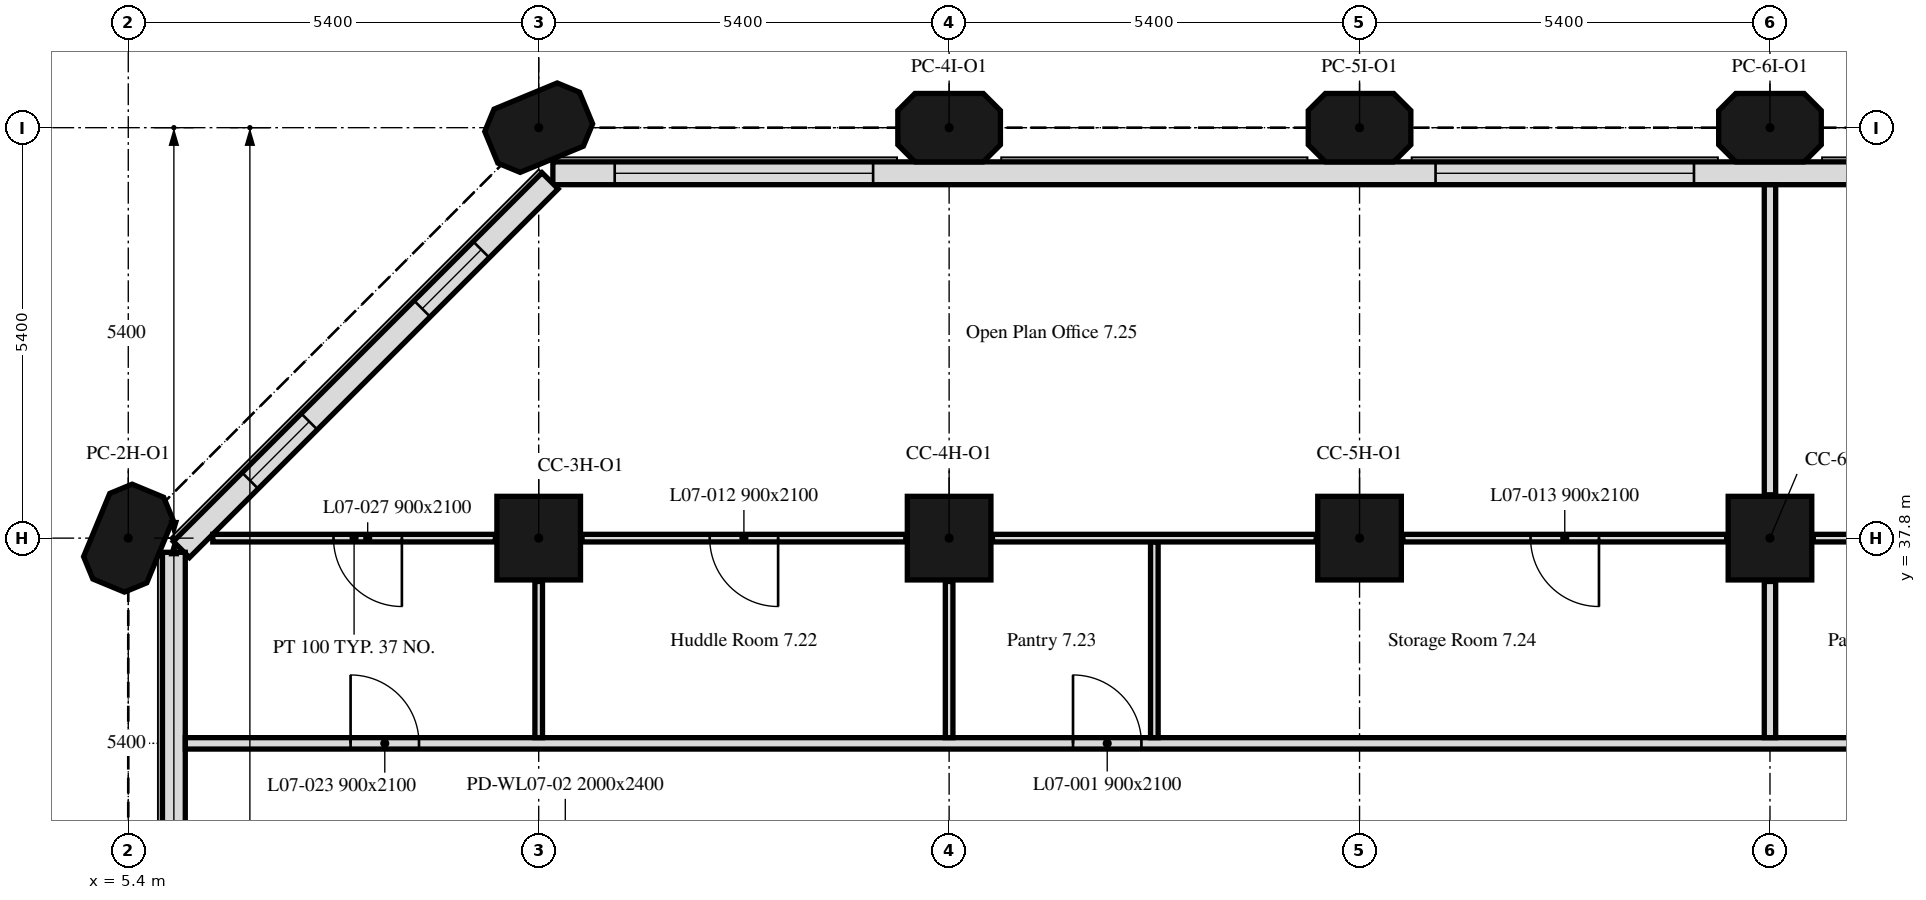
"""IFC4 building model, lengths in metres.
Left out: names, types, materials, properties, quantities, classifications, styles, units other than length and angle.
Written with IfcOpenShell. Run it as: python <this file> out.ifc"""

import sys

from ifc_helpers import new_model, si_unit, direction, frame, frame_2d, origin, origin_2d, place, context, subcontext, project, spatial, polyline, rectangle, outline, extrude, element, fill, save


model = new_model("IFC4")
c1 = context("Model", 3, precision=1e-05, world=origin(), true_north=direction((0.0, 1.0)))
c2 = subcontext(c1, "Body", "Model", "MODEL_VIEW")
j1 = project(units=[si_unit("LENGTHUNIT", "METRE"), si_unit("PLANEANGLEUNIT", "RADIAN")], contexts=[c1])
p1 = place(None, origin())
s1 = spatial("IfcSite", under=j1, at=p1, CompositionType="ELEMENT")
p2 = place(p1, origin())
s2 = spatial("IfcBuilding", under=s1, at=p2, CompositionType="ELEMENT")
p3 = place(p2, frame((0.0, 0.0, 37.4)))
s3 = spatial("IfcBuildingStorey", under=s2, at=p3, CompositionType="ELEMENT", Elevation=37.4)
p4 = place(p3, frame((5.4, 37.8, 0.0), z_axis=(0.0, 0.0, 1.0), x_axis=(0.382683432365, 0.923879532511, 0.0)))
e1 = element("IfcColumn", 1, at=p4, inside=s3, PredefinedType="COLUMN", context=c2, shape_type="SweptSolid", body=[
    extrude(outline(polyline([(-0.45, -0.45), (0.45, -0.45), (0.675, -0.225), (0.675, 0.225), (0.45, 0.45), (-0.45, 0.45), (-0.675, 0.225), (-0.675, -0.225), (-0.45, -0.45)])), origin(), (0.0, 0.0, 1.0), 3.5),
])
for number, where, z_axis, x_axis in (
    (2, (10.8, 37.8, 0.0), (0.0, 0.0, 1.0), (1.0, 0.0, 0.0)),
    (3, (16.2, 37.8, 0.0), (0.0, 0.0, 1.0), (1.0, 0.0, 0.0)),
    (4, (21.6, 37.8, 0.0), (0.0, 0.0, 1.0), (1.0, 0.0, 0.0)),
    (5, (27.0, 37.8, 0.0), (0.0, 0.0, 1.0), (1.0, 0.0, 0.0)),
):
    element("IfcColumn", number, at=place(p3, frame(where, z_axis=z_axis, x_axis=x_axis)), inside=s3, PredefinedType="COLUMN", context=c2, shape_type="SweptSolid", body=[
        extrude(rectangle(XDim=1.1, YDim=1.1, at=origin_2d()), origin(), (0.0, 0.0, 1.0), 3.5),
    ])
for number, where, z_axis, x_axis in (
    (6, (10.8, 43.2, 0.0), (0.0, 0.0, 1.0), (0.924, 0.383, 0.0)),
    (7, (16.2, 43.2, 0.0), (0.0, 0.0, 1.0), (1.0, 0.0, 0.0)),
    (8, (21.6, 43.2, 0.0), (0.0, 0.0, 1.0), (1.0, 0.0, 0.0)),
    (9, (27.0, 43.2, 0.0), (0.0, 0.0, 1.0), (1.0, 0.0, 0.0)),
):
    element("IfcColumn", number, at=place(p3, frame(where, z_axis=z_axis, x_axis=x_axis)), inside=s3, PredefinedType="COLUMN", context=c2, shape_type="SweptSolid", body=[
        extrude(outline(polyline([(-0.45, -0.45), (0.45, -0.45), (0.675, -0.225), (0.675, 0.225), (0.45, 0.45), (-0.45, 0.45), (-0.675, 0.225), (-0.675, -0.225), (-0.45, -0.45)])), origin(), (0.0, 0.0, 1.0), 3.5),
    ])
p5 = place(p3, frame((43.014, 42.6, 0.0), z_axis=(0.0, 0.0, 1.0), x_axis=(-1.0, 0.0, 0.0)))
e10 = element("IfcWall", 10, at=p5, inside=s3, PredefinedType="SOLIDWALL", context=c2, shape_type="SweptSolid", body=[
    extrude(rectangle(XDim=32.027, YDim=0.3, at=frame_2d((16.014, 0.0))), origin(), (0.0, 0.0, 1.0), 3.5),
])
p6 = place(p5, frame((6.214, 0.0, 0.9)))
e11 = element("IfcOpeningElement", 11, at=p6, cuts=e10, PredefinedType="OPENING", context=c2, shape_type="SweptSolid", body=[
    extrude(rectangle(XDim=3.4, YDim=1.7, at=frame_2d((1.7, 0.85))), frame((0.0, 0.16, 0.0), z_axis=(0.0, -1.0, 0.0), x_axis=(1.0, 0.0, 0.0)), (0.0, 0.0, 1.0), 0.32),
])
p7 = place(p5, frame((17.014, 0.0, 0.9)))
e12 = element("IfcOpeningElement", 12, at=p7, cuts=e10, PredefinedType="OPENING", context=c2, shape_type="SweptSolid", body=[
    extrude(rectangle(XDim=3.4, YDim=1.7, at=frame_2d((1.7, 0.85))), frame((0.0, 0.16, 0.0), z_axis=(0.0, -1.0, 0.0), x_axis=(1.0, 0.0, 0.0)), (0.0, 0.0, 1.0), 0.32),
])
p8 = place(p5, frame((27.814, 0.0, 0.9)))
e13 = element("IfcOpeningElement", 13, at=p8, cuts=e10, PredefinedType="OPENING", context=c2, shape_type="SweptSolid", body=[
    extrude(rectangle(XDim=3.4, YDim=1.7, at=frame_2d((1.7, 0.85))), frame((0.0, 0.16, 0.0), z_axis=(0.0, -1.0, 0.0), x_axis=(1.0, 0.0, 0.0)), (0.0, 0.0, 1.0), 0.32),
])
p9 = place(p3, frame((10.949, 42.501, 0.0), z_axis=(0.0, 0.0, 1.0), x_axis=(-0.707106781187, -0.707106781187, 0.0)))
e14 = element("IfcWall", 14, at=p9, inside=s3, PredefinedType="SOLIDWALL", context=c2, shape_type="SweptSolid", body=[
    extrude(rectangle(XDim=6.86, YDim=0.3, at=frame_2d((3.43, 0.0))), origin(), (0.0, 0.0, 1.0), 3.5),
])
p10 = place(p9, frame((1.28, 0.0, 0.9)))
e15 = element("IfcOpeningElement", 15, at=p10, cuts=e14, PredefinedType="OPENING", context=c2, shape_type="SweptSolid", body=[
    extrude(rectangle(XDim=1.1, YDim=1.7, at=frame_2d((0.55, 0.85))), frame((0.0, 0.16, 0.0), z_axis=(0.0, -1.0, 0.0), x_axis=(1.0, 0.0, 0.0)), (0.0, 0.0, 1.0), 0.32),
])
p11 = place(p9, frame((4.48, 0.0, 0.9)))
e16 = element("IfcOpeningElement", 16, at=p11, cuts=e14, PredefinedType="OPENING", context=c2, shape_type="SweptSolid", body=[
    extrude(rectangle(XDim=1.1, YDim=1.7, at=frame_2d((0.55, 0.85))), frame((0.0, 0.16, 0.0), z_axis=(0.0, -1.0, 0.0), x_axis=(1.0, 0.0, 0.0)), (0.0, 0.0, 1.0), 0.32),
])
p12 = place(p3, frame((6.0, 37.614, 0.0), z_axis=(0.0, 0.0, 1.0), x_axis=(0.0, -1.0, 0.0)))
e17 = element("IfcWall", 17, at=p12, inside=s3, PredefinedType="SOLIDWALL", context=c2, shape_type="SweptSolid", body=[
    extrude(rectangle(XDim=5.214, YDim=0.3, at=frame_2d((2.607, 0.0))), origin(), (0.0, 0.0, 1.0), 3.5),
])
p13 = place(p3, frame((6.151, 35.1, 0.0), z_axis=(0.0, 0.0, 1.0), x_axis=(1.0, 0.0, 0.0)))
e18 = element("IfcWall", 18, at=p13, inside=s3, PredefinedType="PARTITIONING", context=c2, shape_type="SweptSolid", body=[
    extrude(rectangle(XDim=41.698, YDim=0.15, at=frame_2d((20.849, 0.0))), origin(), (0.0, 0.0, 1.0), 3.5),
])
p14 = place(p13, frame((11.679, 0.0, 0.0)))
e19 = element("IfcOpeningElement", 19, at=p14, cuts=e18, PredefinedType="OPENING", context=c2, shape_type="SweptSolid", body=[
    extrude(rectangle(XDim=0.9, YDim=2.1, at=frame_2d((0.45, 1.05))), frame((0.0, 0.075, 0.0), z_axis=(0.0, -1.0, 0.0), x_axis=(1.0, 0.0, 0.0)), (0.0, 0.0, 1.0), 0.15),
])
p15 = place(p13, frame((22.479, 0.0, 0.0)))
e20 = element("IfcOpeningElement", 20, at=p15, cuts=e18, PredefinedType="OPENING", context=c2, shape_type="SweptSolid", body=[
    extrude(rectangle(XDim=0.9, YDim=2.1, at=frame_2d((0.45, 1.05))), frame((0.0, 0.075, 0.0), z_axis=(0.0, -1.0, 0.0), x_axis=(1.0, 0.0, 0.0)), (0.0, 0.0, 1.0), 0.15),
])
p16 = place(p13, frame((23.719, 0.0, 0.0)))
e21 = element("IfcOpeningElement", 21, at=p16, cuts=e18, PredefinedType="OPENING", context=c2, shape_type="SweptSolid", body=[
    extrude(rectangle(XDim=0.9, YDim=2.1, at=frame_2d((0.45, 1.05))), frame((0.0, 0.075, 0.0), z_axis=(0.0, -1.0, 0.0), x_axis=(1.0, 0.0, 0.0)), (0.0, 0.0, 1.0), 0.15),
])
p17 = place(p13, frame((33.279, 0.0, 0.0)))
e22 = element("IfcOpeningElement", 22, at=p17, cuts=e18, PredefinedType="OPENING", context=c2, shape_type="SweptSolid", body=[
    extrude(rectangle(XDim=0.9, YDim=2.1, at=frame_2d((0.45, 1.05))), frame((0.0, 0.075, 0.0), z_axis=(0.0, -1.0, 0.0), x_axis=(1.0, 0.0, 0.0)), (0.0, 0.0, 1.0), 0.15),
])
p18 = place(p13, frame((2.174, 0.0, 0.0)))
e23 = element("IfcOpeningElement", 23, at=p18, cuts=e18, PredefinedType="OPENING", context=c2, shape_type="SweptSolid", body=[
    extrude(rectangle(XDim=0.9, YDim=2.1, at=frame_2d((0.45, 1.05))), frame((0.0, 0.075, 0.0), z_axis=(0.0, -1.0, 0.0), x_axis=(1.0, 0.0, 0.0)), (0.0, 0.0, 1.0), 0.15),
])
p19 = place(p13, frame((34.519, 0.0, 0.0)))
e24 = element("IfcOpeningElement", 24, at=p19, cuts=e18, PredefinedType="OPENING", context=c2, shape_type="SweptSolid", body=[
    extrude(rectangle(XDim=0.9, YDim=2.1, at=frame_2d((0.45, 1.05))), frame((0.0, 0.075, 0.0), z_axis=(0.0, -1.0, 0.0), x_axis=(1.0, 0.0, 0.0)), (0.0, 0.0, 1.0), 0.15),
])
p20 = place(p3, frame((10.23, 37.8, 0.0), z_axis=(0.0, 0.0, 1.0), x_axis=(-1.0, 0.0, 0.0)))
e25 = element("IfcWall", 25, at=p20, inside=s3, PredefinedType="PARTITIONING", context=c2, shape_type="SweptSolid", body=[
    extrude(rectangle(XDim=3.718, YDim=0.1, at=frame_2d((1.859, 0.0))), origin(), (0.0, 0.0, 1.0), 3.5),
])
p21 = place(p20, frame((1.23, 0.0, 0.0)))
e26 = element("IfcOpeningElement", 26, at=p21, cuts=e25, PredefinedType="OPENING", context=c2, shape_type="SweptSolid", body=[
    extrude(rectangle(XDim=0.9, YDim=2.1, at=frame_2d((0.45, 1.05))), frame((0.0, 0.05, 0.0), z_axis=(0.0, -1.0, 0.0), x_axis=(1.0, 0.0, 0.0)), (0.0, 0.0, 1.0), 0.1),
])
for number, where, z_axis, x_axis in (
    (27, (10.8, 35.175, 0.0), (0.0, 0.0, 1.0), (0.0, 1.0, 0.0)),
    (28, (16.2, 35.175, 0.0), (0.0, 0.0, 1.0), (0.0, 1.0, 0.0)),
):
    element("IfcWall", number, at=place(p3, frame(where, z_axis=z_axis, x_axis=x_axis)), inside=s3, PredefinedType="PARTITIONING", context=c2, shape_type="SweptSolid", body=[
        extrude(rectangle(XDim=2.055, YDim=0.1, at=frame_2d((1.027, 0.0))), origin(), (0.0, 0.0, 1.0), 3.5),
    ])
p22 = place(p3, frame((15.63, 37.8, 0.0), z_axis=(0.0, 0.0, 1.0), x_axis=(-1.0, 0.0, 0.0)))
e29 = element("IfcWall", 29, at=p22, inside=s3, PredefinedType="PARTITIONING", context=c2, shape_type="SweptSolid", body=[
    extrude(rectangle(XDim=4.26, YDim=0.1, at=frame_2d((2.13, 0.0))), origin(), (0.0, 0.0, 1.0), 3.5),
])
p23 = place(p22, frame((1.68, 0.0, 0.0)))
e30 = element("IfcOpeningElement", 30, at=p23, cuts=e29, PredefinedType="OPENING", context=c2, shape_type="SweptSolid", body=[
    extrude(rectangle(XDim=0.9, YDim=2.1, at=frame_2d((0.45, 1.05))), frame((0.0, 0.05, 0.0), z_axis=(0.0, -1.0, 0.0), x_axis=(1.0, 0.0, 0.0)), (0.0, 0.0, 1.0), 0.1),
])
p24 = place(p3, frame((18.9, 35.175, 0.0), z_axis=(0.0, 0.0, 1.0), x_axis=(0.0, 1.0, 0.0)))
e31 = element("IfcWall", 31, at=p24, inside=s3, PredefinedType="PARTITIONING", context=c2, shape_type="SweptSolid", body=[
    extrude(rectangle(XDim=2.575, YDim=0.1, at=frame_2d((1.288, 0.0))), origin(), (0.0, 0.0, 1.0), 3.5),
])
p25 = place(p3, frame((27.0, 35.175, 0.0), z_axis=(0.0, 0.0, 1.0), x_axis=(0.0, 1.0, 0.0)))
e32 = element("IfcWall", 32, at=p25, inside=s3, PredefinedType="PARTITIONING", context=c2, shape_type="SweptSolid", body=[
    extrude(rectangle(XDim=2.055, YDim=0.15, at=frame_2d((1.027, 0.0))), origin(), (0.0, 0.0, 1.0), 3.5),
])
p26 = place(p3, frame((26.43, 37.8, 0.0), z_axis=(0.0, 0.0, 1.0), x_axis=(-1.0, 0.0, 0.0)))
e33 = element("IfcWall", 33, at=p26, inside=s3, PredefinedType="PARTITIONING", context=c2, shape_type="SweptSolid", body=[
    extrude(rectangle(XDim=4.26, YDim=0.1, at=frame_2d((2.13, 0.0))), origin(), (0.0, 0.0, 1.0), 3.5),
])
p27 = place(p26, frame((1.68, 0.0, 0.0)))
e34 = element("IfcOpeningElement", 34, at=p27, cuts=e33, PredefinedType="OPENING", context=c2, shape_type="SweptSolid", body=[
    extrude(rectangle(XDim=0.9, YDim=2.1, at=frame_2d((0.45, 1.05))), frame((0.0, 0.05, 0.0), z_axis=(0.0, -1.0, 0.0), x_axis=(1.0, 0.0, 0.0)), (0.0, 0.0, 1.0), 0.1),
])
p28 = place(p3, frame((21.03, 37.8, 0.0), z_axis=(0.0, 0.0, 1.0), x_axis=(-1.0, 0.0, 0.0)))
e35 = element("IfcWall", 35, at=p28, inside=s3, PredefinedType="PARTITIONING", context=c2, shape_type="SweptSolid", body=[
    extrude(rectangle(XDim=4.26, YDim=0.1, at=frame_2d((2.13, 0.0))), origin(), (0.0, 0.0, 1.0), 3.5),
])
p29 = place(p3, frame((27.0, 38.37, 0.0), z_axis=(0.0, 0.0, 1.0), x_axis=(0.0, 1.0, 0.0)))
e36 = element("IfcWall", 36, at=p29, inside=s3, PredefinedType="PARTITIONING", context=c2, shape_type="SweptSolid", body=[
    extrude(rectangle(XDim=4.079, YDim=0.15, at=frame_2d((2.04, 0.0))), origin(), (0.0, 0.0, 1.0), 3.5),
])
p30 = place(p3, frame((31.83, 37.8, 0.0), z_axis=(0.0, 0.0, 1.0), x_axis=(-1.0, 0.0, 0.0)))
e37 = element("IfcWall", 37, at=p30, inside=s3, PredefinedType="PARTITIONING", context=c2, shape_type="SweptSolid", body=[
    extrude(rectangle(XDim=4.26, YDim=0.1, at=frame_2d((2.13, 0.0))), origin(), (0.0, 0.0, 1.0), 3.5),
])
p31 = place(p7, origin())
e38 = element("IfcWindow", 38, at=p31, inside=s3, PartitioningType="SINGLE_PANEL", PredefinedType="WINDOW", context=c2, shape_type="SweptSolid", body=[
    extrude(rectangle(XDim=3.4, YDim=1.7, at=frame_2d((1.7, 0.85))), frame((0.0, 0.03, 0.0), z_axis=(0.0, -1.0, 0.0), x_axis=(1.0, 0.0, 0.0)), (0.0, 0.0, 1.0), 0.06),
])
fill(e12, e38)
p32 = place(p8, origin())
e39 = element("IfcWindow", 39, at=p32, inside=s3, PartitioningType="SINGLE_PANEL", PredefinedType="WINDOW", context=c2, shape_type="SweptSolid", body=[
    extrude(rectangle(XDim=3.4, YDim=1.7, at=frame_2d((1.7, 0.85))), frame((0.0, 0.03, 0.0), z_axis=(0.0, -1.0, 0.0), x_axis=(1.0, 0.0, 0.0)), (0.0, 0.0, 1.0), 0.06),
])
fill(e13, e39)
p33 = place(p10, origin())
e40 = element("IfcWindow", 40, at=p33, inside=s3, PartitioningType="SINGLE_PANEL", PredefinedType="WINDOW", context=c2, shape_type="SweptSolid", body=[
    extrude(rectangle(XDim=1.1, YDim=1.7, at=frame_2d((0.55, 0.85))), frame((0.0, 0.03, 0.0), z_axis=(0.0, -1.0, 0.0), x_axis=(1.0, 0.0, 0.0)), (0.0, 0.0, 1.0), 0.06),
])
fill(e15, e40)
p34 = place(p11, origin())
e41 = element("IfcWindow", 41, at=p34, inside=s3, PartitioningType="SINGLE_PANEL", PredefinedType="WINDOW", context=c2, shape_type="SweptSolid", body=[
    extrude(rectangle(XDim=1.1, YDim=1.7, at=frame_2d((0.55, 0.85))), frame((0.0, 0.03, 0.0), z_axis=(0.0, -1.0, 0.0), x_axis=(1.0, 0.0, 0.0)), (0.0, 0.0, 1.0), 0.06),
])
fill(e16, e41)
p35 = place(p14, origin())
e42 = element("IfcDoor", 42, at=p35, inside=s3, OperationType="SINGLE_SWING_LEFT", PredefinedType="DOOR", context=c2, shape_type="SweptSolid", body=[
    extrude(rectangle(XDim=0.9, YDim=2.1, at=frame_2d((0.45, 1.05))), frame((0.0, 0.025, 0.0), z_axis=(0.0, -1.0, 0.0), x_axis=(1.0, 0.0, 0.0)), (0.0, 0.0, 1.0), 0.05),
])
fill(e19, e42)
p36 = place(p23, origin())
e43 = element("IfcDoor", 43, at=p36, inside=s3, OperationType="SINGLE_SWING_LEFT", PredefinedType="DOOR", context=c2, shape_type="SweptSolid", body=[
    extrude(rectangle(XDim=0.9, YDim=2.1, at=frame_2d((0.45, 1.05))), frame((0.0, 0.025, 0.0), z_axis=(0.0, -1.0, 0.0), x_axis=(1.0, 0.0, 0.0)), (0.0, 0.0, 1.0), 0.05),
])
fill(e30, e43)
p37 = place(p27, origin())
e44 = element("IfcDoor", 44, at=p37, inside=s3, OperationType="SINGLE_SWING_RIGHT", PredefinedType="DOOR", context=c2, shape_type="SweptSolid", body=[
    extrude(rectangle(XDim=0.9, YDim=2.1, at=frame_2d((0.45, 1.05))), frame((0.0, 0.025, 0.0), z_axis=(0.0, -1.0, 0.0), x_axis=(1.0, 0.0, 0.0)), (0.0, 0.0, 1.0), 0.05),
])
fill(e34, e44)
p38 = place(p18, origin())
e45 = element("IfcDoor", 45, at=p38, inside=s3, OperationType="SINGLE_SWING_LEFT", PredefinedType="DOOR", context=c2, shape_type="SweptSolid", body=[
    extrude(rectangle(XDim=0.9, YDim=2.1, at=frame_2d((0.45, 1.05))), frame((0.0, 0.025, 0.0), z_axis=(0.0, -1.0, 0.0), x_axis=(1.0, 0.0, 0.0)), (0.0, 0.0, 1.0), 0.05),
])
fill(e23, e45)
p39 = place(p21, origin())
e46 = element("IfcDoor", 46, at=p39, inside=s3, OperationType="SINGLE_SWING_RIGHT", PredefinedType="DOOR", context=c2, shape_type="SweptSolid", body=[
    extrude(rectangle(XDim=0.9, YDim=2.1, at=frame_2d((0.45, 1.05))), frame((0.0, 0.025, 0.0), z_axis=(0.0, -1.0, 0.0), x_axis=(1.0, 0.0, 0.0)), (0.0, 0.0, 1.0), 0.05),
])
fill(e26, e46)
save(model, sys.argv[1])
